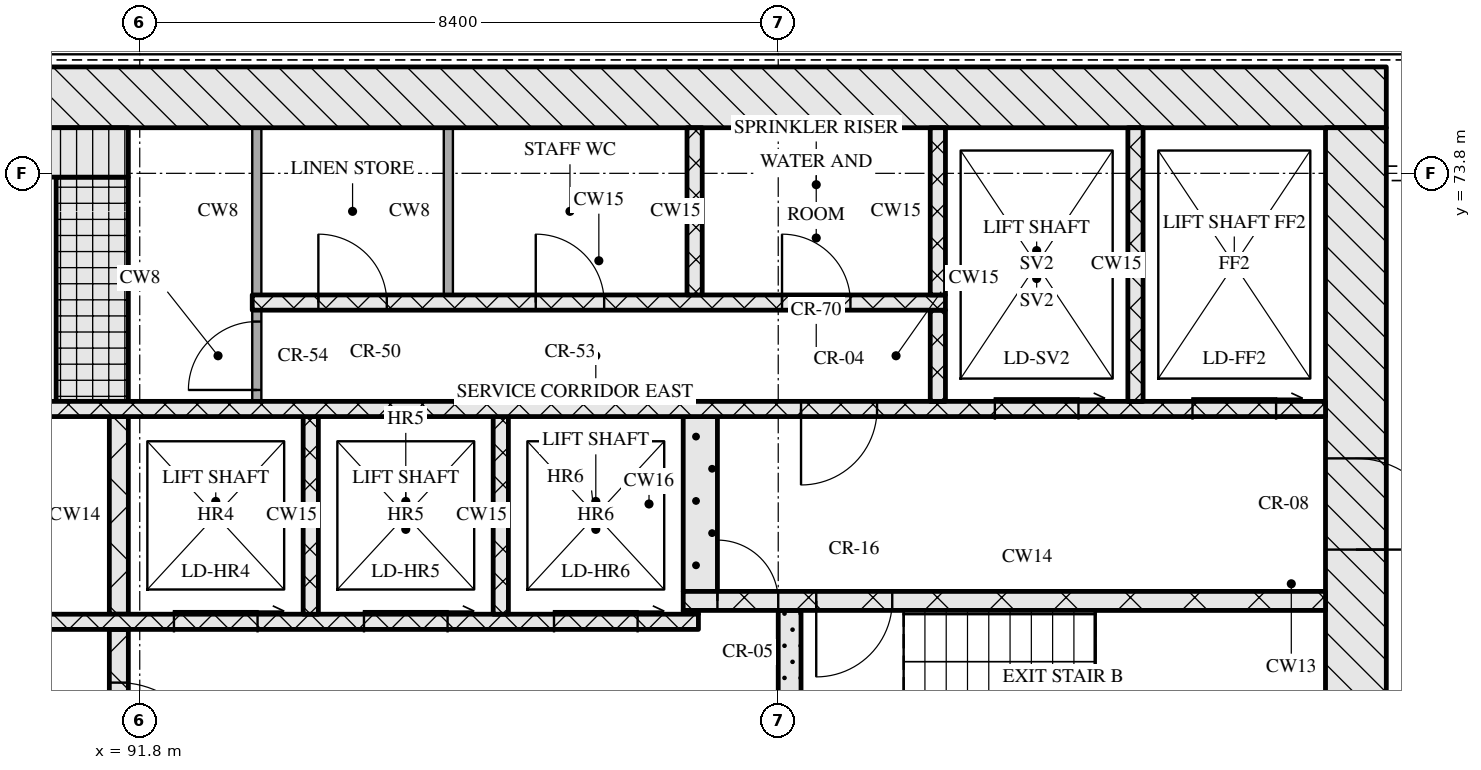
"""IFC4 building model, lengths in metres.
Left out: names, types, materials, properties, quantities, classifications, styles, units other than length and angle.
Written with IfcOpenShell. Run it as: python <this file> out.ifc"""

import sys

from ifc_helpers import new_model, si_unit, direction, frame, frame_2d, origin, place, context, subcontext, project, spatial, rectangle, extrude, element, fill, save


model = new_model("IFC4")
c1 = context("Model", 3, precision=1e-05, world=origin(), true_north=direction((0.0, 1.0)))
c2 = subcontext(c1, "Body", "Model", "MODEL_VIEW")
j1 = project(units=[si_unit("LENGTHUNIT", "METRE"), si_unit("PLANEANGLEUNIT", "RADIAN")], contexts=[c1])
p1 = place(None, origin())
s1 = spatial("IfcSite", under=j1, at=p1, CompositionType="ELEMENT")
p2 = place(p1, origin())
s2 = spatial("IfcBuilding", under=s1, at=p2, CompositionType="ELEMENT")
p3 = place(p2, frame((0.0, 0.0, 147.45)))
s3 = spatial("IfcBuildingStorey", under=s2, at=p3, CompositionType="ELEMENT", Elevation=147.45)
p4 = place(p3, frame((67.0, 74.8, 0.0), z_axis=(0.0, 0.0, 1.0), x_axis=(1.0, 0.0, 0.0)))
e1 = element("IfcWall", 1, at=p4, inside=s3, PredefinedType="SOLIDWALL", context=c2, shape_type="SweptSolid", body=[
    extrude(rectangle(XDim=41.2, YDim=0.8, at=frame_2d((20.6, 0.0))), origin(), (0.0, 0.0, 1.0), 3.32),
])
p5 = place(p3, frame((107.8, 62.4, 0.0), z_axis=(0.0, 0.0, 1.0), x_axis=(0.0, 1.0, 0.0)))
e2 = element("IfcWall", 2, at=p5, inside=s3, PredefinedType="SOLIDWALL", context=c2, shape_type="SweptSolid", body=[
    extrude(rectangle(XDim=12.0, YDim=0.8, at=frame_2d((6.0, 0.0))), origin(), (0.0, 0.0, 1.0), 3.32),
])
p6 = place(p5, frame((6.45, 0.0, 0.0)))
e3 = element("IfcOpeningElement", 3, at=p6, cuts=e2, PredefinedType="OPENING", context=c2, shape_type="SweptSolid", body=[
    extrude(rectangle(XDim=1.2, YDim=2.1, at=frame_2d((0.6, 1.05))), frame((0.0, 0.41, 0.0), z_axis=(0.0, -1.0, 0.0), x_axis=(1.0, 0.0, 0.0)), (0.0, 0.0, 1.0), 0.82),
])
p7 = place(p3, frame((91.525, 65.2, 0.0), z_axis=(0.0, 0.0, 1.0), x_axis=(0.0, 1.0, 0.0)))
e4 = element("IfcWall", 4, at=p7, inside=s3, PredefinedType="SOLIDWALL", context=c2, shape_type="SweptSolid", body=[
    extrude(rectangle(XDim=2.6, YDim=0.25, at=frame_2d((1.3, 0.0))), origin(), (0.0, 0.0, 1.0), 3.32),
])
p8 = place(p7, frame((0.7, 0.0, 0.0)))
e5 = element("IfcOpeningElement", 5, at=p8, cuts=e4, PredefinedType="OPENING", context=c2, shape_type="SweptSolid", body=[
    extrude(rectangle(XDim=1.2, YDim=2.1, at=frame_2d((0.6, 1.05))), frame((0.0, 0.135, 0.0), z_axis=(0.0, -1.0, 0.0), x_axis=(1.0, 0.0, 0.0)), (0.0, 0.0, 1.0), 0.27),
])
p9 = place(p3, frame((100.35, 65.2, 0.0), z_axis=(0.0, 0.0, 1.0), x_axis=(0.0, 1.0, 0.0)))
e6 = element("IfcWall", 6, at=p9, inside=s3, PredefinedType="SOLIDWALL", context=c2, shape_type="SweptSolid", body=[
    extrude(rectangle(XDim=2.85, YDim=0.3, at=frame_2d((1.425, 0.0))), origin(), (0.0, 0.0, 1.0), 3.32),
])
p10 = place(p3, frame((76.05, 67.9, 0.0), z_axis=(0.0, 0.0, 1.0), x_axis=(1.0, 0.0, 0.0)))
e7 = element("IfcWall", 7, at=p10, inside=s3, PredefinedType="SOLIDWALL", context=c2, shape_type="SweptSolid", body=[
    extrude(rectangle(XDim=23.1, YDim=0.2, at=frame_2d((11.55, 0.0))), origin(), (0.0, 0.0, 1.0), 3.32),
])
p11 = place(p10, frame((1.4, 0.0, 0.0)))
e8 = element("IfcOpeningElement", 8, at=p11, cuts=e7, PredefinedType="OPENING", context=c2, shape_type="SweptSolid", body=[
    extrude(rectangle(XDim=0.9, YDim=2.1, at=frame_2d((0.45, 1.05))), frame((0.0, 0.11, 0.0), z_axis=(0.0, -1.0, 0.0), x_axis=(1.0, 0.0, 0.0)), (0.0, 0.0, 1.0), 0.22),
])
p12 = place(p10, frame((5.11, 0.0, 0.0)))
e9 = element("IfcOpeningElement", 9, at=p12, cuts=e7, PredefinedType="OPENING", context=c2, shape_type="SweptSolid", body=[
    extrude(rectangle(XDim=0.9, YDim=2.1, at=frame_2d((0.45, 1.05))), frame((0.0, 0.11, 0.0), z_axis=(0.0, -1.0, 0.0), x_axis=(1.0, 0.0, 0.0)), (0.0, 0.0, 1.0), 0.22),
])
p13 = place(p10, frame((8.45, 0.0, 0.0)))
e10 = element("IfcOpeningElement", 10, at=p13, cuts=e7, PredefinedType="OPENING", context=c2, shape_type="SweptSolid", body=[
    extrude(rectangle(XDim=0.9, YDim=2.1, at=frame_2d((0.45, 1.05))), frame((0.0, 0.11, 0.0), z_axis=(0.0, -1.0, 0.0), x_axis=(1.0, 0.0, 0.0)), (0.0, 0.0, 1.0), 0.22),
])
p14 = place(p10, frame((10.91, 0.0, 0.0)))
e11 = element("IfcOpeningElement", 11, at=p14, cuts=e7, PredefinedType="OPENING", context=c2, shape_type="SweptSolid", body=[
    extrude(rectangle(XDim=0.9, YDim=2.1, at=frame_2d((0.45, 1.05))), frame((0.0, 0.11, 0.0), z_axis=(0.0, -1.0, 0.0), x_axis=(1.0, 0.0, 0.0)), (0.0, 0.0, 1.0), 0.22),
])
p15 = place(p10, frame((13.55, 0.0, 0.0)))
e12 = element("IfcOpeningElement", 12, at=p15, cuts=e7, PredefinedType="OPENING", context=c2, shape_type="SweptSolid", body=[
    extrude(rectangle(XDim=1.0, YDim=2.1, at=frame_2d((0.5, 1.05))), frame((0.0, 0.11, 0.0), z_axis=(0.0, -1.0, 0.0), x_axis=(1.0, 0.0, 0.0)), (0.0, 0.0, 1.0), 0.22),
])
p16 = place(p10, frame((16.2, 0.0, 0.0)))
e13 = element("IfcOpeningElement", 13, at=p16, cuts=e7, PredefinedType="OPENING", context=c2, shape_type="SweptSolid", body=[
    extrude(rectangle(XDim=1.1, YDim=2.1, at=frame_2d((0.55, 1.05))), frame((0.0, 0.11, 0.0), z_axis=(0.0, -1.0, 0.0), x_axis=(1.0, 0.0, 0.0)), (0.0, 0.0, 1.0), 0.22),
])
p17 = place(p10, frame((18.7, 0.0, 0.0)))
e14 = element("IfcOpeningElement", 14, at=p17, cuts=e7, PredefinedType="OPENING", context=c2, shape_type="SweptSolid", body=[
    extrude(rectangle(XDim=1.1, YDim=2.1, at=frame_2d((0.55, 1.05))), frame((0.0, 0.11, 0.0), z_axis=(0.0, -1.0, 0.0), x_axis=(1.0, 0.0, 0.0)), (0.0, 0.0, 1.0), 0.22),
])
p18 = place(p10, frame((21.2, 0.0, 0.0)))
e15 = element("IfcOpeningElement", 15, at=p18, cuts=e7, PredefinedType="OPENING", context=c2, shape_type="SweptSolid", body=[
    extrude(rectangle(XDim=1.1, YDim=2.1, at=frame_2d((0.55, 1.05))), frame((0.0, 0.11, 0.0), z_axis=(0.0, -1.0, 0.0), x_axis=(1.0, 0.0, 0.0)), (0.0, 0.0, 1.0), 0.22),
])
p19 = place(p3, frame((91.525, 68.0, 0.0), z_axis=(0.0, 0.0, 1.0), x_axis=(0.0, 1.0, 0.0)))
e16 = element("IfcWall", 16, at=p19, inside=s3, PredefinedType="SOLIDWALL", context=c2, shape_type="SweptSolid", body=[
    extrude(rectangle(XDim=2.6, YDim=0.25, at=frame_2d((1.3, 0.0))), origin(), (0.0, 0.0, 1.0), 3.32),
])
for number, where, z_axis, x_axis in (
    (17, (94.05, 68.0, 0.0), (0.0, 0.0, 1.0), (0.0, 1.0, 0.0)),
    (18, (96.55, 68.0, 0.0), (0.0, 0.0, 1.0), (0.0, 1.0, 0.0)),
):
    element("IfcWall", number, at=place(p3, frame(where, z_axis=z_axis, x_axis=x_axis)), inside=s3, PredefinedType="SOLIDWALL", context=c2, shape_type="SweptSolid", body=[
        extrude(rectangle(XDim=2.6, YDim=0.2, at=frame_2d((1.3, 0.0))), origin(), (0.0, 0.0, 1.0), 3.32),
    ])
p20 = place(p3, frame((98.95, 68.025, 0.0), z_axis=(0.0, 0.0, 1.0), x_axis=(1.0, 0.0, 0.0)))
e19 = element("IfcWall", 19, at=p20, inside=s3, PredefinedType="SOLIDWALL", context=c2, shape_type="SweptSolid", body=[
    extrude(rectangle(XDim=0.2, YDim=0.05, at=frame_2d((0.1, 0.0))), origin(), (0.0, 0.0, 1.0), 3.32),
])
p21 = place(p3, frame((98.95, 68.175, 0.0), z_axis=(0.0, 0.0, 1.0), x_axis=(1.0, 0.0, 0.0)))
e20 = element("IfcWall", 20, at=p21, inside=s3, PredefinedType="SOLIDWALL", context=c2, shape_type="SweptSolid", body=[
    extrude(rectangle(XDim=8.45, YDim=0.25, at=frame_2d((4.225, 0.0))), origin(), (0.0, 0.0, 1.0), 3.32),
])
p22 = place(p21, frame((0.45, 0.0, 0.0)))
e21 = element("IfcOpeningElement", 21, at=p22, cuts=e20, PredefinedType="OPENING", context=c2, shape_type="SweptSolid", body=[
    extrude(rectangle(XDim=0.8, YDim=2.1, at=frame_2d((0.4, 1.05))), frame((0.0, 0.135, 0.0), z_axis=(0.0, -1.0, 0.0), x_axis=(1.0, 0.0, 0.0)), (0.0, 0.0, 1.0), 0.27),
])
p23 = place(p21, frame((1.75, 0.0, 0.0)))
e22 = element("IfcOpeningElement", 22, at=p23, cuts=e20, PredefinedType="OPENING", context=c2, shape_type="SweptSolid", body=[
    extrude(rectangle(XDim=1.0, YDim=2.1, at=frame_2d((0.5, 1.05))), frame((0.0, 0.135, 0.0), z_axis=(0.0, -1.0, 0.0), x_axis=(1.0, 0.0, 0.0)), (0.0, 0.0, 1.0), 0.27),
])
p24 = place(p3, frame((99.175, 68.3, 0.0), z_axis=(0.0, 0.0, 1.0), x_axis=(0.0, 1.0, 0.0)))
e23 = element("IfcWall", 23, at=p24, inside=s3, PredefinedType="SOLIDWALL", context=c2, shape_type="SweptSolid", body=[
    extrude(rectangle(XDim=2.3, YDim=0.45, at=frame_2d((1.15, 0.0))), origin(), (0.0, 0.0, 1.0), 3.32),
])
p25 = place(p3, frame((67.8, 70.7, 0.0), z_axis=(0.0, 0.0, 1.0), x_axis=(1.0, 0.0, 0.0)))
e24 = element("IfcWall", 24, at=p25, inside=s3, PredefinedType="SOLIDWALL", context=c2, shape_type="SweptSolid", body=[
    extrude(rectangle(XDim=39.6, YDim=0.2, at=frame_2d((19.8, 0.0))), origin(), (0.0, 0.0, 1.0), 3.32),
])
p26 = place(p25, frame((0.65, 0.0, 0.0)))
e25 = element("IfcOpeningElement", 25, at=p26, cuts=e24, PredefinedType="OPENING", context=c2, shape_type="SweptSolid", body=[
    extrude(rectangle(XDim=1.1, YDim=2.1, at=frame_2d((0.55, 1.05))), frame((0.0, 0.11, 0.0), z_axis=(0.0, -1.0, 0.0), x_axis=(1.0, 0.0, 0.0)), (0.0, 0.0, 1.0), 0.22),
])
p27 = place(p25, frame((3.25, 0.0, 0.0)))
e26 = element("IfcOpeningElement", 26, at=p27, cuts=e24, PredefinedType="OPENING", context=c2, shape_type="SweptSolid", body=[
    extrude(rectangle(XDim=1.1, YDim=2.1, at=frame_2d((0.55, 1.05))), frame((0.0, 0.11, 0.0), z_axis=(0.0, -1.0, 0.0), x_axis=(1.0, 0.0, 0.0)), (0.0, 0.0, 1.0), 0.22),
])
p28 = place(p25, frame((5.9, 0.0, 0.0)))
e27 = element("IfcOpeningElement", 27, at=p28, cuts=e24, PredefinedType="OPENING", context=c2, shape_type="SweptSolid", body=[
    extrude(rectangle(XDim=1.0, YDim=2.1, at=frame_2d((0.5, 1.05))), frame((0.0, 0.11, 0.0), z_axis=(0.0, -1.0, 0.0), x_axis=(1.0, 0.0, 0.0)), (0.0, 0.0, 1.0), 0.22),
])
p29 = place(p25, frame((21.7, 0.0, 0.0)))
e28 = element("IfcOpeningElement", 28, at=p29, cuts=e24, PredefinedType="OPENING", context=c2, shape_type="SweptSolid", body=[
    extrude(rectangle(XDim=1.0, YDim=2.1, at=frame_2d((0.5, 1.05))), frame((0.0, 0.11, 0.0), z_axis=(0.0, -1.0, 0.0), x_axis=(1.0, 0.0, 0.0)), (0.0, 0.0, 1.0), 0.22),
])
p30 = place(p25, frame((32.7, 0.0, 0.0)))
e29 = element("IfcOpeningElement", 29, at=p30, cuts=e24, PredefinedType="OPENING", context=c2, shape_type="SweptSolid", body=[
    extrude(rectangle(XDim=1.0, YDim=2.1, at=frame_2d((0.5, 1.05))), frame((0.0, 0.11, 0.0), z_axis=(0.0, -1.0, 0.0), x_axis=(1.0, 0.0, 0.0)), (0.0, 0.0, 1.0), 0.22),
])
p31 = place(p25, frame((35.25, 0.0, 0.0)))
e30 = element("IfcOpeningElement", 30, at=p31, cuts=e24, PredefinedType="OPENING", context=c2, shape_type="SweptSolid", body=[
    extrude(rectangle(XDim=1.1, YDim=2.1, at=frame_2d((0.55, 1.05))), frame((0.0, 0.11, 0.0), z_axis=(0.0, -1.0, 0.0), x_axis=(1.0, 0.0, 0.0)), (0.0, 0.0, 1.0), 0.22),
])
p32 = place(p25, frame((37.85, 0.0, 0.0)))
e31 = element("IfcOpeningElement", 31, at=p32, cuts=e24, PredefinedType="OPENING", context=c2, shape_type="SweptSolid", body=[
    extrude(rectangle(XDim=1.1, YDim=2.1, at=frame_2d((0.55, 1.05))), frame((0.0, 0.11, 0.0), z_axis=(0.0, -1.0, 0.0), x_axis=(1.0, 0.0, 0.0)), (0.0, 0.0, 1.0), 0.22),
])
p33 = place(p3, frame((91.175, 70.8, 0.0), z_axis=(0.0, 0.0, 1.0), x_axis=(0.0, 1.0, 0.0)))
e32 = element("IfcWall", 32, at=p33, inside=s3, PredefinedType="SOLIDWALL", context=c2, shape_type="SweptSolid", body=[
    extrude(rectangle(XDim=2.95, YDim=0.95, at=frame_2d((1.475, 0.0))), origin(), (0.0, 0.0, 1.0), 3.32),
])
p34 = place(p3, frame((93.34, 70.8, 0.0), z_axis=(0.0, 0.0, 1.0), x_axis=(0.0, 1.0, 0.0)))
e33 = element("IfcWall", 33, at=p34, inside=s3, PredefinedType="PARTITIONING", context=c2, shape_type="SweptSolid", body=[
    extrude(rectangle(XDim=1.2, YDim=0.12, at=frame_2d((0.6, 0.0))), origin(), (0.0, 0.0, 1.0), 3.32),
])
p35 = place(p34, frame((0.15, 0.0, 0.0)))
e34 = element("IfcOpeningElement", 34, at=p35, cuts=e33, PredefinedType="OPENING", context=c2, shape_type="SweptSolid", body=[
    extrude(rectangle(XDim=0.9, YDim=2.1, at=frame_2d((0.45, 1.05))), frame((0.0, 0.07, 0.0), z_axis=(0.0, -1.0, 0.0), x_axis=(1.0, 0.0, 0.0)), (0.0, 0.0, 1.0), 0.14),
])
p36 = place(p3, frame((102.3, 70.8, 0.0), z_axis=(0.0, 0.0, 1.0), x_axis=(0.0, 1.0, 0.0)))
e35 = element("IfcWall", 35, at=p36, inside=s3, PredefinedType="SOLIDWALL", context=c2, shape_type="SweptSolid", body=[
    extrude(rectangle(XDim=1.2, YDim=0.2, at=frame_2d((0.6, 0.0))), origin(), (0.0, 0.0, 1.0), 3.32),
])
p37 = place(p3, frame((104.9, 70.8, 0.0), z_axis=(0.0, 0.0, 1.0), x_axis=(0.0, 1.0, 0.0)))
e36 = element("IfcWall", 36, at=p37, inside=s3, PredefinedType="SOLIDWALL", context=c2, shape_type="SweptSolid", body=[
    extrude(rectangle(XDim=3.6, YDim=0.2, at=frame_2d((1.8, 0.0))), origin(), (0.0, 0.0, 1.0), 3.32),
])
p38 = place(p3, frame((93.28, 72.1, 0.0), z_axis=(0.0, 0.0, 1.0), x_axis=(1.0, 0.0, 0.0)))
e37 = element("IfcWall", 37, at=p38, inside=s3, PredefinedType="SOLIDWALL", context=c2, shape_type="SweptSolid", body=[
    extrude(rectangle(XDim=9.12, YDim=0.2, at=frame_2d((4.56, 0.0))), origin(), (0.0, 0.0, 1.0), 3.32),
])
p39 = place(p38, frame((0.87, 0.0, 0.0)))
e38 = element("IfcOpeningElement", 38, at=p39, cuts=e37, PredefinedType="OPENING", context=c2, shape_type="SweptSolid", body=[
    extrude(rectangle(XDim=0.9, YDim=2.1, at=frame_2d((0.45, 1.05))), frame((0.0, 0.11, 0.0), z_axis=(0.0, -1.0, 0.0), x_axis=(1.0, 0.0, 0.0)), (0.0, 0.0, 1.0), 0.22),
])
p40 = place(p38, frame((3.73, 0.0, 0.0)))
e39 = element("IfcOpeningElement", 39, at=p40, cuts=e37, PredefinedType="OPENING", context=c2, shape_type="SweptSolid", body=[
    extrude(rectangle(XDim=0.9, YDim=2.1, at=frame_2d((0.45, 1.05))), frame((0.0, 0.11, 0.0), z_axis=(0.0, -1.0, 0.0), x_axis=(1.0, 0.0, 0.0)), (0.0, 0.0, 1.0), 0.22),
])
p41 = place(p38, frame((6.97, 0.0, 0.0)))
e40 = element("IfcOpeningElement", 40, at=p41, cuts=e37, PredefinedType="OPENING", context=c2, shape_type="SweptSolid", body=[
    extrude(rectangle(XDim=0.9, YDim=2.1, at=frame_2d((0.45, 1.05))), frame((0.0, 0.11, 0.0), z_axis=(0.0, -1.0, 0.0), x_axis=(1.0, 0.0, 0.0)), (0.0, 0.0, 1.0), 0.22),
])
for number, where, z_axis, x_axis in (
    (41, (93.34, 72.2, 0.0), (0.0, 0.0, 1.0), (0.0, 1.0, 0.0)),
    (42, (95.86, 72.2, 0.0), (0.0, 0.0, 1.0), (0.0, 1.0, 0.0)),
):
    element("IfcWall", number, at=place(p3, frame(where, z_axis=z_axis, x_axis=x_axis)), inside=s3, PredefinedType="PARTITIONING", context=c2, shape_type="SweptSolid", body=[
        extrude(rectangle(XDim=2.2, YDim=0.12, at=frame_2d((1.1, 0.0))), origin(), (0.0, 0.0, 1.0), 3.32),
    ])
for number, where, z_axis, x_axis in (
    (43, (99.1, 72.2, 0.0), (0.0, 0.0, 1.0), (0.0, 1.0, 0.0)),
    (44, (102.3, 72.2, 0.0), (0.0, 0.0, 1.0), (0.0, 1.0, 0.0)),
):
    element("IfcWall", number, at=place(p3, frame(where, z_axis=z_axis, x_axis=x_axis)), inside=s3, PredefinedType="SOLIDWALL", context=c2, shape_type="SweptSolid", body=[
        extrude(rectangle(XDim=2.2, YDim=0.2, at=frame_2d((1.1, 0.0))), origin(), (0.0, 0.0, 1.0), 3.32),
    ])
p42 = place(p3, frame((83.55, 74.075, 0.0), z_axis=(0.0, 0.0, 1.0), x_axis=(1.0, 0.0, 0.0)))
e45 = element("IfcWall", 45, at=p42, inside=s3, PredefinedType="SOLIDWALL", context=c2, shape_type="SweptSolid", body=[
    extrude(rectangle(XDim=8.1, YDim=0.65, at=frame_2d((4.05, 0.0))), origin(), (0.0, 0.0, 1.0), 3.32),
])
p43 = place(p8, origin())
e46 = element("IfcDoor", 46, at=p43, inside=s3, OperationType="SINGLE_SWING_RIGHT", PredefinedType="DOOR", context=c2, shape_type="SweptSolid", body=[
    extrude(rectangle(XDim=1.2, YDim=2.1, at=frame_2d((0.6, 1.05))), frame((0.0, 0.025, 0.0), z_axis=(0.0, -1.0, 0.0), x_axis=(1.0, 0.0, 0.0)), (0.0, 0.0, 1.0), 0.05),
])
fill(e5, e46)
p44 = place(p16, origin())
e47 = element("IfcDoor", 47, at=p44, inside=s3, OperationType="SLIDING_TO_RIGHT", PredefinedType="DOOR", context=c2, shape_type="SweptSolid", body=[
    extrude(rectangle(XDim=1.1, YDim=2.1, at=frame_2d((0.55, 1.05))), frame((0.0, 0.025, 0.0), z_axis=(0.0, -1.0, 0.0), x_axis=(1.0, 0.0, 0.0)), (0.0, 0.0, 1.0), 0.05),
])
fill(e13, e47)
p45 = place(p17, origin())
e48 = element("IfcDoor", 48, at=p45, inside=s3, OperationType="SLIDING_TO_RIGHT", PredefinedType="DOOR", context=c2, shape_type="SweptSolid", body=[
    extrude(rectangle(XDim=1.1, YDim=2.1, at=frame_2d((0.55, 1.05))), frame((0.0, 0.025, 0.0), z_axis=(0.0, -1.0, 0.0), x_axis=(1.0, 0.0, 0.0)), (0.0, 0.0, 1.0), 0.05),
])
fill(e14, e48)
p46 = place(p18, origin())
e49 = element("IfcDoor", 49, at=p46, inside=s3, OperationType="SLIDING_TO_RIGHT", PredefinedType="DOOR", context=c2, shape_type="SweptSolid", body=[
    extrude(rectangle(XDim=1.1, YDim=2.1, at=frame_2d((0.55, 1.05))), frame((0.0, 0.025, 0.0), z_axis=(0.0, -1.0, 0.0), x_axis=(1.0, 0.0, 0.0)), (0.0, 0.0, 1.0), 0.05),
])
fill(e15, e49)
p47 = place(p22, origin())
e50 = element("IfcDoor", 50, at=p47, inside=s3, OperationType="SINGLE_SWING_LEFT", PredefinedType="DOOR", context=c2, shape_type="SweptSolid", body=[
    extrude(rectangle(XDim=0.8, YDim=2.1, at=frame_2d((0.4, 1.05))), frame((0.0, 0.025, 0.0), z_axis=(0.0, -1.0, 0.0), x_axis=(1.0, 0.0, 0.0)), (0.0, 0.0, 1.0), 0.05),
])
fill(e21, e50)
p48 = place(p23, origin())
e51 = element("IfcDoor", 51, at=p48, inside=s3, OperationType="SINGLE_SWING_RIGHT", PredefinedType="DOOR", context=c2, shape_type="SweptSolid", body=[
    extrude(rectangle(XDim=1.0, YDim=2.1, at=frame_2d((0.5, 1.05))), frame((0.0, 0.025, 0.0), z_axis=(0.0, -1.0, 0.0), x_axis=(1.0, 0.0, 0.0)), (0.0, 0.0, 1.0), 0.05),
])
fill(e22, e51)
p49 = place(p6, origin())
e52 = element("IfcDoor", 52, at=p49, inside=s3, OperationType="SINGLE_SWING_RIGHT", PredefinedType="DOOR", context=c2, shape_type="SweptSolid", body=[
    extrude(rectangle(XDim=1.2, YDim=2.1, at=frame_2d((0.6, 1.05))), frame((0.0, 0.025, 0.0), z_axis=(0.0, -1.0, 0.0), x_axis=(1.0, 0.0, 0.0)), (0.0, 0.0, 1.0), 0.05),
])
fill(e3, e52)
p50 = place(p30, origin())
e53 = element("IfcDoor", 53, at=p50, inside=s3, OperationType="SINGLE_SWING_RIGHT", PredefinedType="DOOR", context=c2, shape_type="SweptSolid", body=[
    extrude(rectangle(XDim=1.0, YDim=2.1, at=frame_2d((0.5, 1.05))), frame((0.0, 0.025, 0.0), z_axis=(0.0, -1.0, 0.0), x_axis=(1.0, 0.0, 0.0)), (0.0, 0.0, 1.0), 0.05),
])
fill(e29, e53)
p51 = place(p31, origin())
e54 = element("IfcDoor", 54, at=p51, inside=s3, OperationType="SLIDING_TO_RIGHT", PredefinedType="DOOR", context=c2, shape_type="SweptSolid", body=[
    extrude(rectangle(XDim=1.1, YDim=2.1, at=frame_2d((0.55, 1.05))), frame((0.0, 0.025, 0.0), z_axis=(0.0, -1.0, 0.0), x_axis=(1.0, 0.0, 0.0)), (0.0, 0.0, 1.0), 0.05),
])
fill(e30, e54)
p52 = place(p32, origin())
e55 = element("IfcDoor", 55, at=p52, inside=s3, OperationType="SLIDING_TO_RIGHT", PredefinedType="DOOR", context=c2, shape_type="SweptSolid", body=[
    extrude(rectangle(XDim=1.1, YDim=2.1, at=frame_2d((0.55, 1.05))), frame((0.0, 0.025, 0.0), z_axis=(0.0, -1.0, 0.0), x_axis=(1.0, 0.0, 0.0)), (0.0, 0.0, 1.0), 0.05),
])
fill(e31, e55)
p53 = place(p35, origin())
e56 = element("IfcDoor", 56, at=p53, inside=s3, OperationType="SINGLE_SWING_LEFT", PredefinedType="DOOR", context=c2, shape_type="SweptSolid", body=[
    extrude(rectangle(XDim=0.9, YDim=2.1, at=frame_2d((0.45, 1.05))), frame((0.0, 0.025, 0.0), z_axis=(0.0, -1.0, 0.0), x_axis=(1.0, 0.0, 0.0)), (0.0, 0.0, 1.0), 0.05),
])
fill(e34, e56)
p54 = place(p39, origin())
e57 = element("IfcDoor", 57, at=p54, inside=s3, OperationType="SINGLE_SWING_LEFT", PredefinedType="DOOR", context=c2, shape_type="SweptSolid", body=[
    extrude(rectangle(XDim=0.9, YDim=2.1, at=frame_2d((0.45, 1.05))), frame((0.0, 0.025, 0.0), z_axis=(0.0, -1.0, 0.0), x_axis=(1.0, 0.0, 0.0)), (0.0, 0.0, 1.0), 0.05),
])
fill(e38, e57)
p55 = place(p40, origin())
e58 = element("IfcDoor", 58, at=p55, inside=s3, OperationType="SINGLE_SWING_LEFT", PredefinedType="DOOR", context=c2, shape_type="SweptSolid", body=[
    extrude(rectangle(XDim=0.9, YDim=2.1, at=frame_2d((0.45, 1.05))), frame((0.0, 0.025, 0.0), z_axis=(0.0, -1.0, 0.0), x_axis=(1.0, 0.0, 0.0)), (0.0, 0.0, 1.0), 0.05),
])
fill(e39, e58)
p56 = place(p41, origin())
e59 = element("IfcDoor", 59, at=p56, inside=s3, OperationType="SINGLE_SWING_LEFT", PredefinedType="DOOR", context=c2, shape_type="SweptSolid", body=[
    extrude(rectangle(XDim=0.9, YDim=2.1, at=frame_2d((0.45, 1.05))), frame((0.0, 0.025, 0.0), z_axis=(0.0, -1.0, 0.0), x_axis=(1.0, 0.0, 0.0)), (0.0, 0.0, 1.0), 0.05),
])
fill(e40, e59)
save(model, sys.argv[1])
